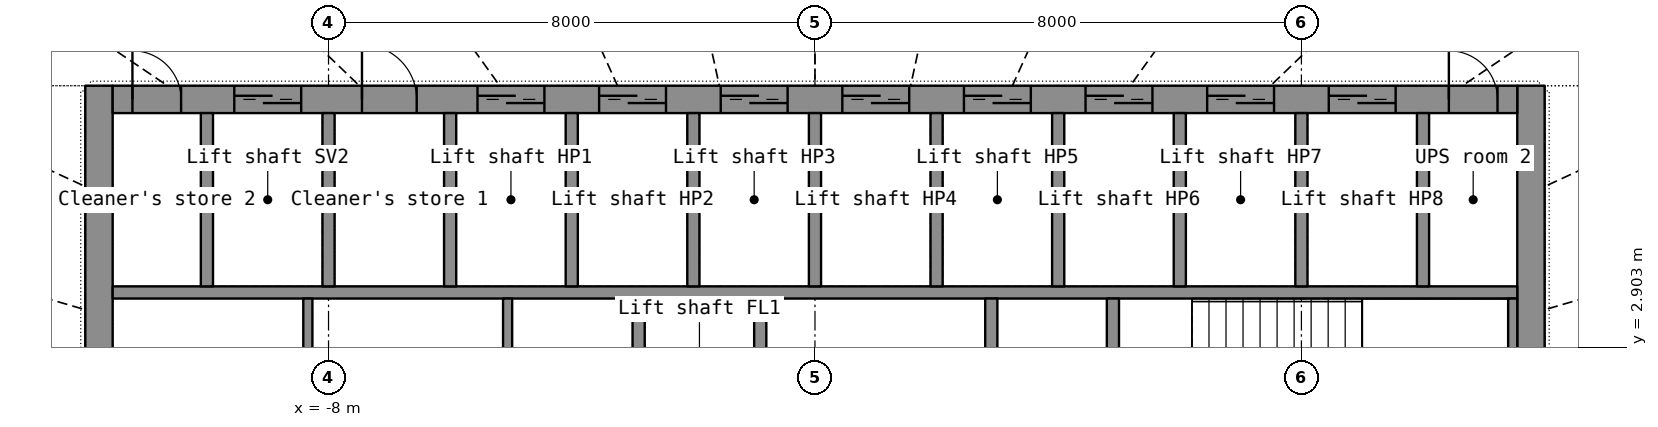
"""IFC4 building model, lengths in metres.
Left out: names, types, materials, properties, quantities, classifications, styles, units other than length and angle.
Written with IfcOpenShell. Run it as: python <this file> out.ifc"""

import sys

from ifc_helpers import new_model, si_unit, direction, frame, frame_2d, origin, place, context, subcontext, project, spatial, rectangle, extrude, element, fill, save


model = new_model("IFC4")
c1 = context("Model", 3, precision=1e-05, world=origin(), true_north=direction((0.0, 1.0)))
c2 = subcontext(c1, "Body", "Model", "MODEL_VIEW")
j1 = project(units=[si_unit("LENGTHUNIT", "METRE"), si_unit("PLANEANGLEUNIT", "RADIAN")], contexts=[c1])
p1 = place(None, origin())
s1 = spatial("IfcSite", under=j1, at=p1, CompositionType="ELEMENT")
p2 = place(p1, origin())
s2 = spatial("IfcBuilding", under=s1, at=p2, CompositionType="ELEMENT")
p3 = place(p2, frame((0.0, 0.0, 194.1)))
s3 = spatial("IfcBuildingStorey", under=s2, at=p3, CompositionType="ELEMENT", Elevation=194.1)
p4 = place(p3, frame((-11.775, -7.2, 0.0), z_axis=(0.0, 0.0, 1.0), x_axis=(0.0, 1.0, 0.0)))
e1 = element("IfcWall", 1, at=p4, inside=s3, PredefinedType="SHEAR", context=c2, shape_type="SweptSolid", body=[
    extrude(rectangle(XDim=14.4, YDim=0.45, at=frame_2d((7.2, 0.0))), origin(), (0.0, 0.0, 1.0), 3.3),
])
p5 = place(p4, frame((6.5, 0.0, 0.0)))
e2 = element("IfcOpeningElement", 2, at=p5, cuts=e1, PredefinedType="OPENING", context=c2, shape_type="SweptSolid", body=[
    extrude(rectangle(XDim=1.4, YDim=2.2, at=frame_2d((0.7, 1.1))), frame((0.0, 0.235, 0.0), z_axis=(0.0, -1.0, 0.0), x_axis=(1.0, 0.0, 0.0)), (0.0, 0.0, 1.0), 0.47),
])
p6 = place(p3, frame((11.775, -7.2, 0.0), z_axis=(0.0, 0.0, 1.0), x_axis=(0.0, 1.0, 0.0)))
e3 = element("IfcWall", 3, at=p6, inside=s3, PredefinedType="SHEAR", context=c2, shape_type="SweptSolid", body=[
    extrude(rectangle(XDim=14.4, YDim=0.45, at=frame_2d((7.2, 0.0))), origin(), (0.0, 0.0, 1.0), 3.3),
])
p7 = place(p6, frame((6.5, 0.0, 0.0)))
e4 = element("IfcOpeningElement", 4, at=p7, cuts=e3, PredefinedType="OPENING", context=c2, shape_type="SweptSolid", body=[
    extrude(rectangle(XDim=1.4, YDim=2.2, at=frame_2d((0.7, 1.1))), frame((0.0, 0.235, 0.0), z_axis=(0.0, -1.0, 0.0), x_axis=(1.0, 0.0, 0.0)), (0.0, 0.0, 1.0), 0.47),
])
p8 = place(p3, frame((-11.55, 6.975, 0.0), z_axis=(0.0, 0.0, 1.0), x_axis=(1.0, 0.0, 0.0)))
e5 = element("IfcWall", 5, at=p8, inside=s3, PredefinedType="SHEAR", context=c2, shape_type="SweptSolid", body=[
    extrude(rectangle(XDim=23.1, YDim=0.45, at=frame_2d((11.55, 0.0))), origin(), (0.0, 0.0, 1.0), 3.3),
])
p9 = place(p8, frame((2.0, 0.0, 0.0)))
e6 = element("IfcOpeningElement", 6, at=p9, cuts=e5, PredefinedType="OPENING", context=c2, shape_type="SweptSolid", body=[
    extrude(rectangle(XDim=1.1, YDim=2.2, at=frame_2d((0.55, 1.1))), frame((0.0, 0.235, 0.0), z_axis=(0.0, -1.0, 0.0), x_axis=(1.0, 0.0, 0.0)), (0.0, 0.0, 1.0), 0.47),
])
p10 = place(p8, frame((6.0, 0.0, 0.0)))
e7 = element("IfcOpeningElement", 7, at=p10, cuts=e5, PredefinedType="OPENING", context=c2, shape_type="SweptSolid", body=[
    extrude(rectangle(XDim=1.1, YDim=2.2, at=frame_2d((0.55, 1.1))), frame((0.0, 0.235, 0.0), z_axis=(0.0, -1.0, 0.0), x_axis=(1.0, 0.0, 0.0)), (0.0, 0.0, 1.0), 0.47),
])
p11 = place(p8, frame((8.0, 0.0, 0.0)))
e8 = element("IfcOpeningElement", 8, at=p11, cuts=e5, PredefinedType="OPENING", context=c2, shape_type="SweptSolid", body=[
    extrude(rectangle(XDim=1.1, YDim=2.2, at=frame_2d((0.55, 1.1))), frame((0.0, 0.235, 0.0), z_axis=(0.0, -1.0, 0.0), x_axis=(1.0, 0.0, 0.0)), (0.0, 0.0, 1.0), 0.47),
])
p12 = place(p8, frame((10.0, 0.0, 0.0)))
e9 = element("IfcOpeningElement", 9, at=p12, cuts=e5, PredefinedType="OPENING", context=c2, shape_type="SweptSolid", body=[
    extrude(rectangle(XDim=1.1, YDim=2.2, at=frame_2d((0.55, 1.1))), frame((0.0, 0.235, 0.0), z_axis=(0.0, -1.0, 0.0), x_axis=(1.0, 0.0, 0.0)), (0.0, 0.0, 1.0), 0.47),
])
p13 = place(p8, frame((12.0, 0.0, 0.0)))
e10 = element("IfcOpeningElement", 10, at=p13, cuts=e5, PredefinedType="OPENING", context=c2, shape_type="SweptSolid", body=[
    extrude(rectangle(XDim=1.1, YDim=2.2, at=frame_2d((0.55, 1.1))), frame((0.0, 0.235, 0.0), z_axis=(0.0, -1.0, 0.0), x_axis=(1.0, 0.0, 0.0)), (0.0, 0.0, 1.0), 0.47),
])
p14 = place(p8, frame((14.0, 0.0, 0.0)))
e11 = element("IfcOpeningElement", 11, at=p14, cuts=e5, PredefinedType="OPENING", context=c2, shape_type="SweptSolid", body=[
    extrude(rectangle(XDim=1.1, YDim=2.2, at=frame_2d((0.55, 1.1))), frame((0.0, 0.235, 0.0), z_axis=(0.0, -1.0, 0.0), x_axis=(1.0, 0.0, 0.0)), (0.0, 0.0, 1.0), 0.47),
])
p15 = place(p8, frame((16.0, 0.0, 0.0)))
e12 = element("IfcOpeningElement", 12, at=p15, cuts=e5, PredefinedType="OPENING", context=c2, shape_type="SweptSolid", body=[
    extrude(rectangle(XDim=1.1, YDim=2.2, at=frame_2d((0.55, 1.1))), frame((0.0, 0.235, 0.0), z_axis=(0.0, -1.0, 0.0), x_axis=(1.0, 0.0, 0.0)), (0.0, 0.0, 1.0), 0.47),
])
p16 = place(p8, frame((18.0, 0.0, 0.0)))
e13 = element("IfcOpeningElement", 13, at=p16, cuts=e5, PredefinedType="OPENING", context=c2, shape_type="SweptSolid", body=[
    extrude(rectangle(XDim=1.1, YDim=2.2, at=frame_2d((0.55, 1.1))), frame((0.0, 0.235, 0.0), z_axis=(0.0, -1.0, 0.0), x_axis=(1.0, 0.0, 0.0)), (0.0, 0.0, 1.0), 0.47),
])
p17 = place(p8, frame((20.0, 0.0, 0.0)))
e14 = element("IfcOpeningElement", 14, at=p17, cuts=e5, PredefinedType="OPENING", context=c2, shape_type="SweptSolid", body=[
    extrude(rectangle(XDim=1.1, YDim=2.2, at=frame_2d((0.55, 1.1))), frame((0.0, 0.235, 0.0), z_axis=(0.0, -1.0, 0.0), x_axis=(1.0, 0.0, 0.0)), (0.0, 0.0, 1.0), 0.47),
])
p18 = place(p8, frame((4.1, 0.0, 0.0)))
e15 = element("IfcOpeningElement", 15, at=p18, cuts=e5, PredefinedType="OPENING", context=c2, shape_type="SweptSolid", body=[
    extrude(rectangle(XDim=0.9, YDim=2.1, at=frame_2d((0.45, 1.05))), frame((0.0, 0.235, 0.0), z_axis=(0.0, -1.0, 0.0), x_axis=(1.0, 0.0, 0.0)), (0.0, 0.0, 1.0), 0.47),
])
p19 = place(p8, frame((0.325, 0.0, 0.0)))
e16 = element("IfcOpeningElement", 16, at=p19, cuts=e5, PredefinedType="OPENING", context=c2, shape_type="SweptSolid", body=[
    extrude(rectangle(XDim=0.8, YDim=2.05, at=frame_2d((0.4, 1.025))), frame((0.0, 0.235, 0.0), z_axis=(0.0, -1.0, 0.0), x_axis=(1.0, 0.0, 0.0)), (0.0, 0.0, 1.0), 0.47),
])
p20 = place(p8, frame((21.975, 0.0, 0.0)))
e17 = element("IfcOpeningElement", 17, at=p20, cuts=e5, PredefinedType="OPENING", context=c2, shape_type="SweptSolid", body=[
    extrude(rectangle(XDim=0.8, YDim=2.05, at=frame_2d((0.4, 1.025))), frame((0.0, 0.235, 0.0), z_axis=(0.0, -1.0, 0.0), x_axis=(1.0, 0.0, 0.0)), (0.0, 0.0, 1.0), 0.47),
])
p21 = place(p3, frame((-11.55, 3.8, 0.0), z_axis=(0.0, 0.0, 1.0), x_axis=(1.0, 0.0, 0.0)))
e18 = element("IfcWall", 18, at=p21, inside=s3, PredefinedType="SHEAR", context=c2, shape_type="SweptSolid", body=[
    extrude(rectangle(XDim=23.1, YDim=0.2, at=frame_2d((11.55, 0.0))), origin(), (0.0, 0.0, 1.0), 3.3),
])
for number, where, z_axis, x_axis in (
    (19, (-10.0, 3.9, 0.0), (0.0, 0.0, 1.0), (0.0, 1.0, 0.0)),
    (20, (-8.0, 3.9, 0.0), (0.0, 0.0, 1.0), (0.0, 1.0, 0.0)),
    (21, (-6.0, 3.9, 0.0), (0.0, 0.0, 1.0), (0.0, 1.0, 0.0)),
    (22, (-4.0, 3.9, 0.0), (0.0, 0.0, 1.0), (0.0, 1.0, 0.0)),
    (23, (-2.0, 3.9, 0.0), (0.0, 0.0, 1.0), (0.0, 1.0, 0.0)),
    (24, (0.0, 3.9, 0.0), (0.0, 0.0, 1.0), (0.0, 1.0, 0.0)),
    (25, (2.0, 3.9, 0.0), (0.0, 0.0, 1.0), (0.0, 1.0, 0.0)),
    (26, (4.0, 3.9, 0.0), (0.0, 0.0, 1.0), (0.0, 1.0, 0.0)),
    (27, (6.0, 3.9, 0.0), (0.0, 0.0, 1.0), (0.0, 1.0, 0.0)),
    (28, (8.0, 3.9, 0.0), (0.0, 0.0, 1.0), (0.0, 1.0, 0.0)),
    (29, (10.0, 3.9, 0.0), (0.0, 0.0, 1.0), (0.0, 1.0, 0.0)),
):
    element("IfcWall", number, at=place(p3, frame(where, z_axis=z_axis, x_axis=x_axis)), inside=s3, PredefinedType="SHEAR", context=c2, shape_type="SweptSolid", body=[
        extrude(rectangle(XDim=2.85, YDim=0.2, at=frame_2d((1.425, 0.0))), origin(), (0.0, 0.0, 1.0), 3.3),
    ])
p22 = place(p3, frame((-2.9, -3.7, 0.0), z_axis=(0.0, 0.0, 1.0), x_axis=(0.0, 1.0, 0.0)))
e30 = element("IfcWall", 30, at=p22, inside=s3, PredefinedType="SHEAR", context=c2, shape_type="SweptSolid", body=[
    extrude(rectangle(XDim=7.4, YDim=0.2, at=frame_2d((3.7, 0.0))), origin(), (0.0, 0.0, 1.0), 3.3),
])
p23 = place(p22, frame((3.1, 0.0, 0.0)))
e31 = element("IfcOpeningElement", 31, at=p23, cuts=e30, PredefinedType="OPENING", context=c2, shape_type="SweptSolid", body=[
    extrude(rectangle(XDim=1.2, YDim=2.2, at=frame_2d((0.6, 1.1))), frame((0.0, 0.11, 0.0), z_axis=(0.0, -1.0, 0.0), x_axis=(1.0, 0.0, 0.0)), (0.0, 0.0, 1.0), 0.22),
])
p24 = place(p3, frame((2.9, -3.7, 0.0), z_axis=(0.0, 0.0, 1.0), x_axis=(0.0, 1.0, 0.0)))
e32 = element("IfcWall", 32, at=p24, inside=s3, PredefinedType="SHEAR", context=c2, shape_type="SweptSolid", body=[
    extrude(rectangle(XDim=7.4, YDim=0.2, at=frame_2d((3.7, 0.0))), origin(), (0.0, 0.0, 1.0), 3.3),
])
p25 = place(p24, frame((3.1, 0.0, 0.0)))
e33 = element("IfcOpeningElement", 33, at=p25, cuts=e32, PredefinedType="OPENING", context=c2, shape_type="SweptSolid", body=[
    extrude(rectangle(XDim=1.2, YDim=2.2, at=frame_2d((0.6, 1.1))), frame((0.0, 0.11, 0.0), z_axis=(0.0, -1.0, 0.0), x_axis=(1.0, 0.0, 0.0)), (0.0, 0.0, 1.0), 0.22),
])
p26 = place(p3, frame((-0.9, 1.35, 0.0), z_axis=(0.0, 0.0, 1.0), x_axis=(0.0, 1.0, 0.0)))
e34 = element("IfcWall", 34, at=p26, inside=s3, PredefinedType="SHEAR", context=c2, shape_type="SweptSolid", body=[
    extrude(rectangle(XDim=2.35, YDim=0.2, at=frame_2d((1.175, 0.0))), origin(), (0.0, 0.0, 1.0), 3.3),
])
p27 = place(p3, frame((11.475, 1.35, 0.0), z_axis=(0.0, 0.0, 1.0), x_axis=(0.0, 1.0, 0.0)))
e35 = element("IfcWall", 35, at=p27, inside=s3, PredefinedType="SHEAR", context=c2, shape_type="SweptSolid", body=[
    extrude(rectangle(XDim=2.35, YDim=0.15, at=frame_2d((1.175, 0.0))), origin(), (0.0, 0.0, 1.0), 3.3),
])
p28 = place(p3, frame((4.9, 1.35, 0.0), z_axis=(0.0, 0.0, 1.0), x_axis=(0.0, 1.0, 0.0)))
e36 = element("IfcWall", 36, at=p28, inside=s3, PredefinedType="SHEAR", context=c2, shape_type="SweptSolid", body=[
    extrude(rectangle(XDim=2.35, YDim=0.2, at=frame_2d((1.175, 0.0))), origin(), (0.0, 0.0, 1.0), 3.3),
])
for number, where, z_axis, x_axis in (
    (37, (-8.34, 1.35, 0.0), (0.0, 0.0, 1.0), (0.0, 1.0, 0.0)),
    (38, (-5.055, 1.35, 0.0), (0.0, 0.0, 1.0), (0.0, 1.0, 0.0)),
):
    element("IfcWall", number, at=place(p3, frame(where, z_axis=z_axis, x_axis=x_axis)), inside=s3, PredefinedType="PARTITIONING", context=c2, shape_type="SweptSolid", body=[
        extrude(rectangle(XDim=2.35, YDim=0.15, at=frame_2d((1.175, 0.0))), origin(), (0.0, 0.0, 1.0), 3.3),
    ])
p29 = place(p9, origin())
e39 = element("IfcDoor", 39, at=p29, inside=s3, OperationType="DOUBLE_DOOR_SLIDING", PredefinedType="DOOR", context=c2, shape_type="SweptSolid", body=[
    extrude(rectangle(XDim=1.1, YDim=2.2, at=frame_2d((0.55, 1.1))), frame((0.0, 0.025, 0.0), z_axis=(0.0, -1.0, 0.0), x_axis=(1.0, 0.0, 0.0)), (0.0, 0.0, 1.0), 0.05),
])
fill(e6, e39)
p30 = place(p10, origin())
e40 = element("IfcDoor", 40, at=p30, inside=s3, OperationType="DOUBLE_DOOR_SLIDING", PredefinedType="DOOR", context=c2, shape_type="SweptSolid", body=[
    extrude(rectangle(XDim=1.1, YDim=2.2, at=frame_2d((0.55, 1.1))), frame((0.0, 0.025, 0.0), z_axis=(0.0, -1.0, 0.0), x_axis=(1.0, 0.0, 0.0)), (0.0, 0.0, 1.0), 0.05),
])
fill(e7, e40)
p31 = place(p11, origin())
e41 = element("IfcDoor", 41, at=p31, inside=s3, OperationType="DOUBLE_DOOR_SLIDING", PredefinedType="DOOR", context=c2, shape_type="SweptSolid", body=[
    extrude(rectangle(XDim=1.1, YDim=2.2, at=frame_2d((0.55, 1.1))), frame((0.0, 0.025, 0.0), z_axis=(0.0, -1.0, 0.0), x_axis=(1.0, 0.0, 0.0)), (0.0, 0.0, 1.0), 0.05),
])
fill(e8, e41)
p32 = place(p12, origin())
e42 = element("IfcDoor", 42, at=p32, inside=s3, OperationType="DOUBLE_DOOR_SLIDING", PredefinedType="DOOR", context=c2, shape_type="SweptSolid", body=[
    extrude(rectangle(XDim=1.1, YDim=2.2, at=frame_2d((0.55, 1.1))), frame((0.0, 0.025, 0.0), z_axis=(0.0, -1.0, 0.0), x_axis=(1.0, 0.0, 0.0)), (0.0, 0.0, 1.0), 0.05),
])
fill(e9, e42)
p33 = place(p13, origin())
e43 = element("IfcDoor", 43, at=p33, inside=s3, OperationType="DOUBLE_DOOR_SLIDING", PredefinedType="DOOR", context=c2, shape_type="SweptSolid", body=[
    extrude(rectangle(XDim=1.1, YDim=2.2, at=frame_2d((0.55, 1.1))), frame((0.0, 0.025, 0.0), z_axis=(0.0, -1.0, 0.0), x_axis=(1.0, 0.0, 0.0)), (0.0, 0.0, 1.0), 0.05),
])
fill(e10, e43)
p34 = place(p14, origin())
e44 = element("IfcDoor", 44, at=p34, inside=s3, OperationType="DOUBLE_DOOR_SLIDING", PredefinedType="DOOR", context=c2, shape_type="SweptSolid", body=[
    extrude(rectangle(XDim=1.1, YDim=2.2, at=frame_2d((0.55, 1.1))), frame((0.0, 0.025, 0.0), z_axis=(0.0, -1.0, 0.0), x_axis=(1.0, 0.0, 0.0)), (0.0, 0.0, 1.0), 0.05),
])
fill(e11, e44)
p35 = place(p15, origin())
e45 = element("IfcDoor", 45, at=p35, inside=s3, OperationType="DOUBLE_DOOR_SLIDING", PredefinedType="DOOR", context=c2, shape_type="SweptSolid", body=[
    extrude(rectangle(XDim=1.1, YDim=2.2, at=frame_2d((0.55, 1.1))), frame((0.0, 0.025, 0.0), z_axis=(0.0, -1.0, 0.0), x_axis=(1.0, 0.0, 0.0)), (0.0, 0.0, 1.0), 0.05),
])
fill(e12, e45)
p36 = place(p16, origin())
e46 = element("IfcDoor", 46, at=p36, inside=s3, OperationType="DOUBLE_DOOR_SLIDING", PredefinedType="DOOR", context=c2, shape_type="SweptSolid", body=[
    extrude(rectangle(XDim=1.1, YDim=2.2, at=frame_2d((0.55, 1.1))), frame((0.0, 0.025, 0.0), z_axis=(0.0, -1.0, 0.0), x_axis=(1.0, 0.0, 0.0)), (0.0, 0.0, 1.0), 0.05),
])
fill(e13, e46)
p37 = place(p17, origin())
e47 = element("IfcDoor", 47, at=p37, inside=s3, OperationType="DOUBLE_DOOR_SLIDING", PredefinedType="DOOR", context=c2, shape_type="SweptSolid", body=[
    extrude(rectangle(XDim=1.1, YDim=2.2, at=frame_2d((0.55, 1.1))), frame((0.0, 0.025, 0.0), z_axis=(0.0, -1.0, 0.0), x_axis=(1.0, 0.0, 0.0)), (0.0, 0.0, 1.0), 0.05),
])
fill(e14, e47)
p38 = place(p18, origin())
e48 = element("IfcDoor", 48, at=p38, inside=s3, OperationType="SINGLE_SWING_LEFT", PredefinedType="DOOR", context=c2, shape_type="SweptSolid", body=[
    extrude(rectangle(XDim=0.9, YDim=2.1, at=frame_2d((0.45, 1.05))), frame((0.0, 0.025, 0.0), z_axis=(0.0, -1.0, 0.0), x_axis=(1.0, 0.0, 0.0)), (0.0, 0.0, 1.0), 0.05),
])
fill(e15, e48)
p39 = place(p19, origin())
e49 = element("IfcDoor", 49, at=p39, inside=s3, OperationType="SINGLE_SWING_LEFT", PredefinedType="DOOR", context=c2, shape_type="SweptSolid", body=[
    extrude(rectangle(XDim=0.8, YDim=2.05, at=frame_2d((0.4, 1.025))), frame((0.0, 0.025, 0.0), z_axis=(0.0, -1.0, 0.0), x_axis=(1.0, 0.0, 0.0)), (0.0, 0.0, 1.0), 0.05),
])
fill(e16, e49)
p40 = place(p20, origin())
e50 = element("IfcDoor", 50, at=p40, inside=s3, OperationType="SINGLE_SWING_LEFT", PredefinedType="DOOR", context=c2, shape_type="SweptSolid", body=[
    extrude(rectangle(XDim=0.8, YDim=2.05, at=frame_2d((0.4, 1.025))), frame((0.0, 0.025, 0.0), z_axis=(0.0, -1.0, 0.0), x_axis=(1.0, 0.0, 0.0)), (0.0, 0.0, 1.0), 0.05),
])
fill(e17, e50)
save(model, sys.argv[1])
